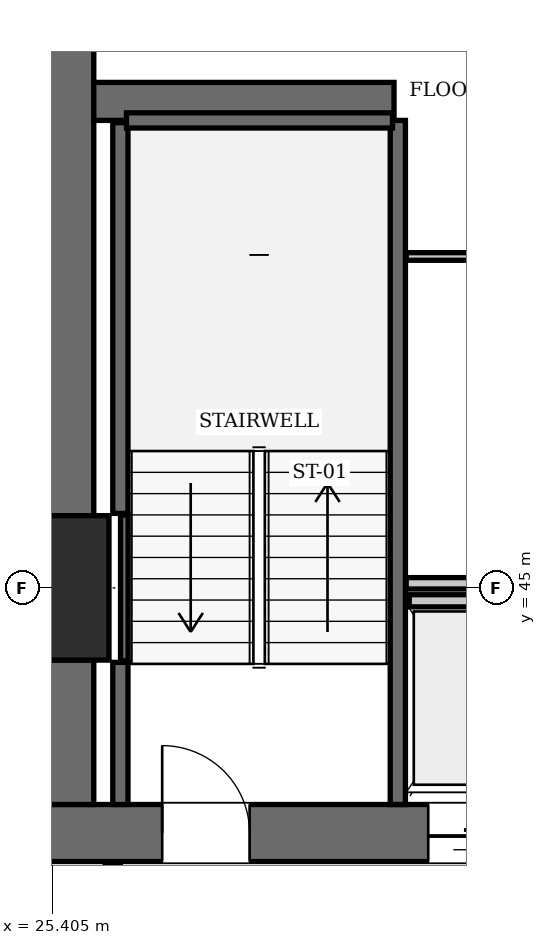
"""IFC4 building model, lengths in metres.
Left out: names, types, materials, properties, quantities, classifications, styles, units other than length and angle.
Written with IfcOpenShell. Run it as: python <this file> out.ifc"""

import sys

from ifc_helpers import new_model, si_unit, direction, frame, frame_2d, origin, origin_2d, place, context, subcontext, project, spatial, rectangle, extrude, element, fill, save


model = new_model("IFC4")
c1 = context("Model", 3, precision=1e-05, world=origin(), true_north=direction((0.0, 1.0)))
c2 = subcontext(c1, "Body", "Model", "MODEL_VIEW")
j1 = project(units=[si_unit("LENGTHUNIT", "METRE"), si_unit("PLANEANGLEUNIT", "RADIAN")], contexts=[c1])
p1 = place(None, origin())
s1 = spatial("IfcSite", under=j1, at=p1, CompositionType="ELEMENT")
p2 = place(p1, origin())
s2 = spatial("IfcBuilding", under=s1, at=p2, CompositionType="ELEMENT")
p3 = place(p2, frame((0.0, 0.0, 208.25)))
s3 = spatial("IfcBuildingStorey", under=s2, at=p3, CompositionType="ELEMENT", Elevation=208.25)
p4 = place(p3, frame((25.2, 45.0, 0.0), z_axis=(0.0, 0.0, 1.0), x_axis=(1.0, 0.0, 0.0)))
e1 = element("IfcColumn", 1, at=p4, inside=s3, PredefinedType="COLUMN", context=c2, shape_type="SweptSolid", body=[
    extrude(rectangle(XDim=1.9, YDim=1.9, at=origin_2d()), origin(), (0.0, 0.0, 1.0), 3.85),
])
p5 = place(p3, frame((25.2, 41.775, 0.0), z_axis=(0.0, 0.0, 1.0), x_axis=(1.0, 0.0, 0.0)))
e2 = element("IfcWall", 2, at=p5, inside=s3, PredefinedType="SHEAR", context=c2, shape_type="SweptSolid", body=[
    extrude(rectangle(XDim=6.8, YDim=0.75, at=frame_2d((3.4, 0.0))), origin(), (0.0, 0.0, 1.0), 3.85),
])
p6 = place(p5, frame((1.65, 0.0, 0.0)))
e3 = element("IfcOpeningElement", 3, at=p6, cuts=e2, PredefinedType="OPENING", context=c2, shape_type="SweptSolid", body=[
    extrude(rectangle(XDim=1.15, YDim=2.15, at=frame_2d((0.575, 1.075))), frame((0.0, 0.385, 0.0), z_axis=(0.0, -1.0, 0.0), x_axis=(1.0, 0.0, 0.0)), (0.0, 0.0, 1.0), 0.77),
])
p7 = place(p5, frame((5.15, 0.0, 0.0)))
e4 = element("IfcOpeningElement", 4, at=p7, cuts=e2, PredefinedType="OPENING", context=c2, shape_type="SweptSolid", body=[
    extrude(rectangle(XDim=1.1, YDim=2.2, at=frame_2d((0.55, 1.1))), frame((0.0, 0.385, 0.0), z_axis=(0.0, -1.0, 0.0), x_axis=(1.0, 0.0, 0.0)), (0.0, 0.0, 1.0), 0.77),
])
p8 = place(p3, frame((25.575, 42.15, 0.0), z_axis=(0.0, 0.0, 1.0), x_axis=(0.0, 1.0, 0.0)))
e5 = element("IfcWall", 5, at=p8, inside=s3, PredefinedType="SHEAR", context=c2, shape_type="SweptSolid", body=[
    extrude(rectangle(XDim=1.9, YDim=0.75, at=frame_2d((0.95, 0.0))), origin(), (0.0, 0.0, 1.0), 3.85),
])
p9 = place(p3, frame((25.575, 45.95, 0.0), z_axis=(0.0, 0.0, 1.0), x_axis=(0.0, 1.0, 0.0)))
e6 = element("IfcWall", 6, at=p9, inside=s3, PredefinedType="SHEAR", context=c2, shape_type="SweptSolid", body=[
    extrude(rectangle(XDim=7.3, YDim=0.75, at=frame_2d((3.65, 0.0))), origin(), (0.0, 0.0, 1.0), 3.85),
])
p10 = place(p3, frame((25.95, 51.4, 0.0), z_axis=(0.0, 0.0, 1.0), x_axis=(1.0, 0.0, 0.0)))
e7 = element("IfcWall", 7, at=p10, inside=s3, PredefinedType="SHEAR", context=c2, shape_type="SweptSolid", body=[
    extrude(rectangle(XDim=3.95, YDim=0.5, at=frame_2d((1.975, 0.0))), origin(), (0.0, 0.0, 1.0), 3.85),
])
p11 = place(p3, frame((29.95, 42.15, 0.0), z_axis=(0.0, 0.0, 1.0), x_axis=(0.0, 1.0, 0.0)))
e8 = element("IfcWall", 8, at=p11, inside=s3, PredefinedType="SOLIDWALL", context=c2, shape_type="SweptSolid", body=[
    extrude(rectangle(XDim=9.0, YDim=0.2, at=frame_2d((4.5, 0.0))), origin(), (0.0, 0.0, 1.0), 3.61),
])
p12 = place(p3, frame((26.3, 42.15, 0.0), z_axis=(0.0, 0.0, 1.0), x_axis=(0.0, 1.0, 0.0)))
e9 = element("IfcWall", 9, at=p12, inside=s3, PredefinedType="SOLIDWALL", context=c2, shape_type="SweptSolid", body=[
    extrude(rectangle(XDim=1.87, YDim=0.2, at=frame_2d((0.935, 0.0))), origin(), (0.0, 0.0, 1.0), 3.61),
])
p13 = place(p3, frame((26.3, 45.98, 0.0), z_axis=(0.0, 0.0, 1.0), x_axis=(0.0, 1.0, 0.0)))
e10 = element("IfcWall", 10, at=p13, inside=s3, PredefinedType="SOLIDWALL", context=c2, shape_type="SweptSolid", body=[
    extrude(rectangle(XDim=5.14, YDim=0.2, at=frame_2d((2.57, 0.0))), origin(), (0.0, 0.0, 1.0), 3.61),
])
p14 = place(p3, frame((26.38, 51.15, 0.0), z_axis=(0.0, 0.0, 1.0), x_axis=(1.0, 0.0, 0.0)))
e11 = element("IfcWall", 11, at=p14, inside=s3, PredefinedType="SOLIDWALL", context=c2, shape_type="SweptSolid", body=[
    extrude(rectangle(XDim=3.5, YDim=0.2, at=frame_2d((1.75, 0.0))), origin(), (0.0, 0.0, 1.0), 3.61),
])
p15 = place(p3, frame((26.352, 44.04, 0.0), z_axis=(0.0, 0.0, 1.0), x_axis=(0.0, 1.0, 0.0)))
e12 = element("IfcWall", 12, at=p15, inside=s3, PredefinedType="SOLIDWALL", context=c2, shape_type="SweptSolid", body=[
    extrude(rectangle(XDim=1.92, YDim=0.1, at=frame_2d((0.96, 0.0))), origin(), (0.0, 0.0, 1.0), 3.61),
])
p16 = place(p3, frame((30.1, 44.83, 0.0), z_axis=(0.0, 0.0, 1.0), x_axis=(1.0, 0.0, 0.0)))
e13 = element("IfcWall", 13, at=p16, inside=s3, PredefinedType="SOLIDWALL", context=c2, shape_type="SweptSolid", body=[
    extrude(rectangle(XDim=1.6, YDim=0.16, at=frame_2d((0.8, 0.0))), origin(), (0.0, 0.0, 1.0), 3.61),
])
p17 = place(p3, frame((26.2, 38.31, 0.0), z_axis=(0.0, 0.0, 1.0), x_axis=(0.0, 1.0, 0.0)))
e14 = element("IfcWall", 14, at=p17, inside=s3, PredefinedType="PARTITIONING", context=c2, shape_type="SweptSolid", body=[
    extrude(rectangle(XDim=3.07, YDim=0.2, at=frame_2d((1.535, 0.0))), origin(), (0.0, 0.0, 1.0), 3.61),
])
p18 = place(p3, frame((30.06, 45.06, 0.0), z_axis=(0.0, 0.0, 1.0), x_axis=(1.0, 0.0, 0.0)))
e15 = element("IfcWall", 15, at=p18, inside=s3, PredefinedType="PARTITIONING", context=c2, shape_type="SweptSolid", body=[
    extrude(rectangle(XDim=3.18, YDim=0.15, at=frame_2d((1.59, 0.0))), origin(), (0.0, 0.0, 1.0), 3.61),
])
p19 = place(p3, frame((30.06, 49.36, 0.0), z_axis=(0.0, 0.0, 1.0), x_axis=(1.0, 0.0, 0.0)))
e16 = element("IfcWall", 16, at=p19, inside=s3, PredefinedType="PARTITIONING", context=c2, shape_type="SweptSolid", body=[
    extrude(rectangle(XDim=3.18, YDim=0.1, at=frame_2d((1.59, 0.0))), origin(), (0.0, 0.0, 1.0), 3.61),
])
p20 = place(p19, frame((1.95, 0.0, 0.0)))
e17 = element("IfcOpeningElement", 17, at=p20, cuts=e16, PredefinedType="OPENING", context=c2, shape_type="SweptSolid", body=[
    extrude(rectangle(XDim=0.8, YDim=2.05, at=frame_2d((0.4, 1.025))), frame((0.0, 0.06, 0.0), z_axis=(0.0, -1.0, 0.0), x_axis=(1.0, 0.0, 0.0)), (0.0, 0.0, 1.0), 0.12),
])
p21 = place(p6, origin())
e18 = element("IfcDoor", 18, at=p21, inside=s3, OperationType="SINGLE_SWING_LEFT", PredefinedType="DOOR", context=c2, shape_type="SweptSolid", body=[
    extrude(rectangle(XDim=1.15, YDim=2.15, at=frame_2d((0.575, 1.075))), frame((0.0, 0.025, 0.0), z_axis=(0.0, -1.0, 0.0), x_axis=(1.0, 0.0, 0.0)), (0.0, 0.0, 1.0), 0.05),
])
fill(e3, e18)
p22 = place(p7, frame((1.1, 0.0, 0.0), z_axis=(0.0, 0.0, 1.0), x_axis=(-1.0, 0.0, 0.0)))
e19 = element("IfcDoor", 19, at=p22, inside=s3, OperationType="SLIDING_TO_LEFT", PredefinedType="DOOR", context=c2, shape_type="SweptSolid", body=[
    extrude(rectangle(XDim=1.1, YDim=2.2, at=frame_2d((0.55, 1.1))), frame((0.0, 0.025, 0.0), z_axis=(0.0, -1.0, 0.0), x_axis=(1.0, 0.0, 0.0)), (0.0, 0.0, 1.0), 0.05),
])
fill(e4, e19)
save(model, sys.argv[1])
